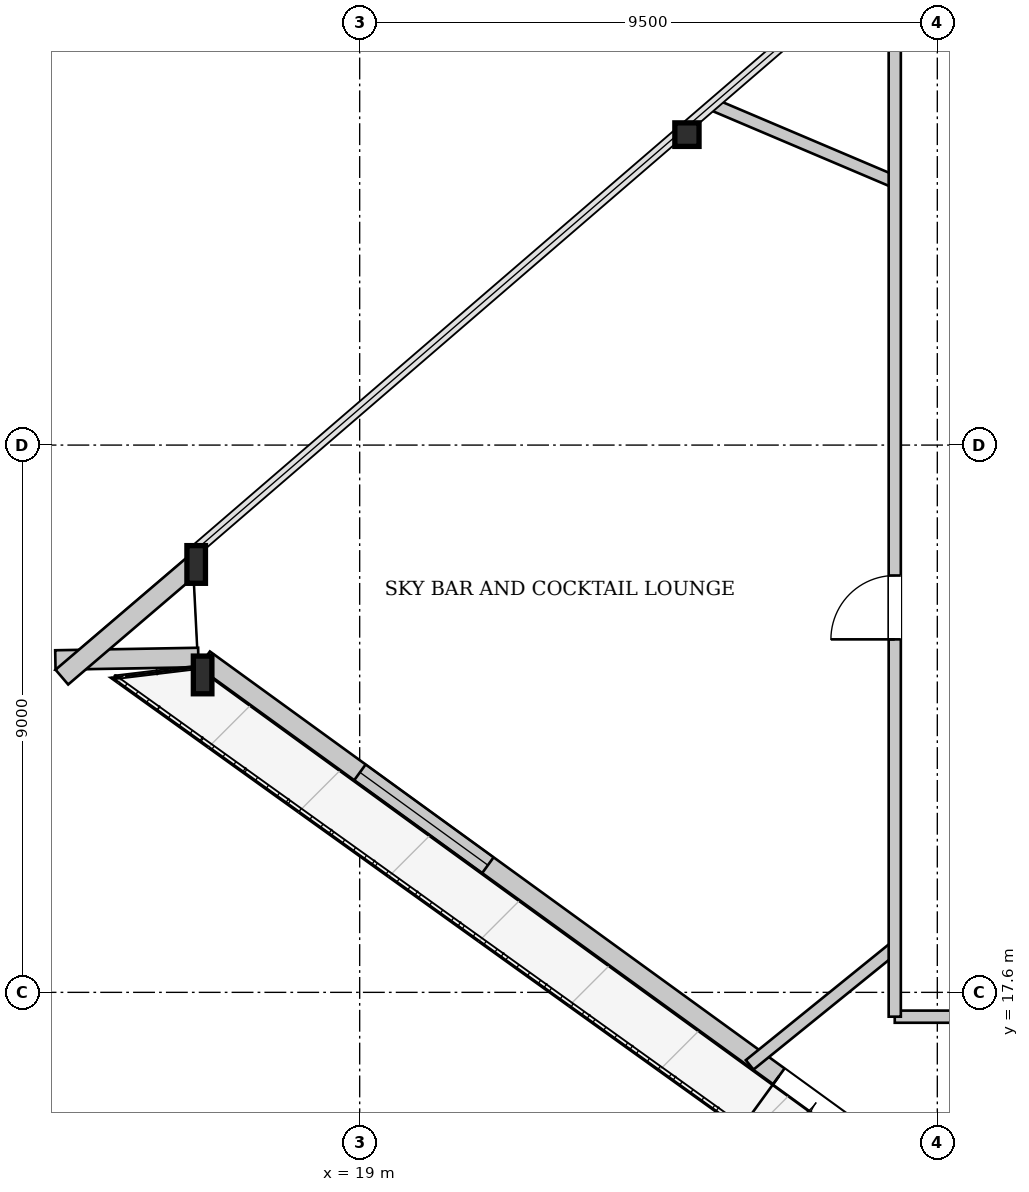
"""IFC4 building model, lengths in metres.
Left out: names, types, materials, properties, quantities, classifications, styles, units other than length and angle.
Written with IfcOpenShell. Run it as: python <this file> out.ifc"""

import sys

from ifc_helpers import new_model, si_unit, direction, frame, frame_2d, origin, origin_2d, place, context, subcontext, project, spatial, rectangle, i_section, extrude, source, transform, mapped, element, fill, save


model = new_model("IFC4")
c1 = context("Model", 3, precision=1e-05, world=origin(), true_north=direction((0.0, 1.0)))
c2 = subcontext(c1, "Body", "Model", "MODEL_VIEW")
j1 = project(units=[si_unit("LENGTHUNIT", "METRE"), si_unit("PLANEANGLEUNIT", "RADIAN")], contexts=[c1])
p1 = place(None, origin())
s1 = spatial("IfcSite", under=j1, at=p1, CompositionType="ELEMENT")
p2 = place(p1, origin())
s2 = spatial("IfcBuilding", under=s1, at=p2, CompositionType="ELEMENT")
p3 = place(p2, frame((0.0, 0.0, 281.9)))
s3 = spatial("IfcBuildingStorey", under=s2, at=p3, CompositionType="ELEMENT", Elevation=281.9)
m1 = source(origin(), c2, "Body", "SweptSolid", [
    extrude(i_section(OverallWidth=0.398, OverallDepth=0.387, WebThickness=0.019, FlangeThickness=0.029, at=origin_2d()), origin(), (0.0, 0.0, 1.0), 3.945),
])
p4 = place(p3, frame((24.392, 31.847, 0.0), z_axis=(-0.004888714821, -0.071598013262, 0.997421588379), x_axis=(0.997677037813, -0.068121422634, 0.0)))
e1 = element("IfcColumn", 1, at=p4, inside=s3, PredefinedType="COLUMN", context=c2, shape_type="MappedRepresentation", body=[
    mapped(m1, transform((0.0, 0.0, 0.0), x_axis=(1.0, 0.0, 0.0), y_axis=(0.0, 1.0, 0.0), z_axis=(0.0, 0.0, 1.0), scale=1.0)),
])
m2 = source(origin(), c2, "Body", "SweptSolid", [
    extrude(i_section(OverallWidth=0.305, OverallDepth=0.62, WebThickness=0.021, FlangeThickness=0.04, at=origin_2d()), origin(), (0.0, 0.0, 1.0), 3.956),
])
p5 = place(p3, frame((16.253, 24.833, 0.0), z_axis=(0.029189564882, -0.098923620519, 0.994666821908), x_axis=(0.95911741707, 0.283008445586, 0.0)))
e2 = element("IfcColumn", 2, at=p5, inside=s3, PredefinedType="COLUMN", context=c2, shape_type="MappedRepresentation", body=[
    mapped(m2, transform((0.0, 0.0, 0.0), x_axis=(1.0, 0.0, 0.0), y_axis=(0.0, 1.0, 0.0), z_axis=(0.0, 0.0, 1.0), scale=1.0)),
])
m3 = source(origin(), c2, "Body", "SweptSolid", [
    extrude(i_section(OverallWidth=0.305, OverallDepth=0.62, WebThickness=0.021, FlangeThickness=0.04, at=origin_2d()), origin(), (0.0, 0.0, 1.0), 3.946),
])
p6 = place(p3, frame((16.349, 22.947, 0.0), z_axis=(0.034527375469, -0.064290220632, 0.997333759518), x_axis=(0.880987884191, 0.473138825196, 0.0)))
e3 = element("IfcColumn", 3, at=p6, inside=s3, PredefinedType="COLUMN", context=c2, shape_type="MappedRepresentation", body=[
    mapped(m3, transform((0.0, 0.0, 0.0), x_axis=(1.0, 0.0, 0.0), y_axis=(0.0, 1.0, 0.0), z_axis=(0.0, 0.0, 1.0), scale=1.0)),
])
p7 = place(p3, frame((30.342, 12.993, 0.0), z_axis=(0.0, 0.0, 1.0), x_axis=(-0.80942781076, 0.587219396111, 0.0)))
e4 = element("IfcWall", 4, at=p7, inside=s3, PredefinedType="SOLIDWALL", context=c2, shape_type="SweptSolid", body=[
    extrude(rectangle(XDim=17.172, YDim=0.32, at=frame_2d((8.586, 0.0))), origin(), (0.0, 0.0, 1.0), 3.462),
])
p8 = place(p7, frame((3.995, 0.0, 0.0)))
e5 = element("IfcOpeningElement", 5, at=p8, cuts=e4, PredefinedType="OPENING", context=c2, shape_type="SweptSolid", body=[
    extrude(rectangle(XDim=1.5, YDim=2.3, at=frame_2d((0.75, 1.15))), frame((0.0, 0.17, 0.0), z_axis=(0.0, -1.0, 0.0), x_axis=(1.0, 0.0, 0.0)), (0.0, 0.0, 1.0), 0.34),
])
p9 = place(p7, frame((11.407, 0.0, 0.65)))
e6 = element("IfcOpeningElement", 6, at=p9, cuts=e4, PredefinedType="OPENING", context=c2, shape_type="SweptSolid", body=[
    extrude(rectangle(XDim=2.6, YDim=2.35, at=frame_2d((1.3, 1.175))), frame((0.0, 0.17, 0.0), z_axis=(0.0, -1.0, 0.0), x_axis=(1.0, 0.0, 0.0)), (0.0, 0.0, 1.0), 0.34),
])
p10 = place(p3, frame((16.346, 23.107, 0.0), z_axis=(0.0, 0.0, 1.0), x_axis=(-0.99984786229, -0.01744282875, 0.0)))
e7 = element("IfcWall", 7, at=p10, inside=s3, PredefinedType="SOLIDWALL", context=c2, shape_type="SweptSolid", body=[
    extrude(rectangle(XDim=2.351, YDim=0.32, at=frame_2d((1.176, 0.0))), origin(), (0.0, 0.0, 1.0), 3.462),
])
p11 = place(p3, frame((14.102, 22.784, 0.0), z_axis=(0.0, 0.0, 1.0), x_axis=(0.760365209759, 0.649495764257, 0.0)))
e8 = element("IfcWall", 8, at=p11, inside=s3, PredefinedType="SOLIDWALL", context=c2, shape_type="SweptSolid", body=[
    extrude(rectangle(XDim=2.966, YDim=0.32, at=frame_2d((1.483, 0.0))), origin(), (0.0, 0.0, 1.0), 3.462),
])
p12 = place(p3, frame((27.8, 30.93, 0.0), z_axis=(0.0, 0.0, 1.0), x_axis=(-0.920507458903, 0.390724990376, 0.0)))
e9 = element("IfcWall", 9, at=p12, inside=s3, PredefinedType="PARTITIONING", context=c2, shape_type="SweptSolid", body=[
    extrude(rectangle(XDim=3.222, YDim=0.2, at=frame_2d((1.611, 0.0))), origin(), (0.0, 0.0, 1.0), 3.92),
])
p13 = place(p3, frame((27.8, 18.34, 0.0), z_axis=(0.0, 0.0, 1.0), x_axis=(-0.777170804973, -0.629289710625, 0.0)))
e10 = element("IfcWall", 10, at=p13, inside=s3, PredefinedType="PARTITIONING", context=c2, shape_type="SweptSolid", body=[
    extrude(rectangle(XDim=3.071, YDim=0.2, at=frame_2d((1.535, 0.0))), origin(), (0.0, 0.0, 1.0), 3.92),
])
p14 = place(p3, frame((27.8, 17.2, 0.0), z_axis=(0.0, 0.0, 1.0), x_axis=(1.0, 0.0, 0.0)))
e11 = element("IfcWall", 11, at=p14, inside=s3, PredefinedType="PARTITIONING", context=c2, shape_type="SweptSolid", body=[
    extrude(rectangle(XDim=20.4, YDim=0.2, at=frame_2d((10.2, 0.0))), origin(), (0.0, 0.0, 1.0), 3.92),
])
p15 = place(p14, frame((5.209, 0.0, 0.0)))
e12 = element("IfcOpeningElement", 12, at=p15, cuts=e11, PredefinedType="OPENING", context=c2, shape_type="SweptSolid", body=[
    extrude(rectangle(XDim=1.05, YDim=2.2, at=frame_2d((0.525, 1.1))), frame((0.0, 0.11, 0.0), z_axis=(0.0, -1.0, 0.0), x_axis=(1.0, 0.0, 0.0)), (0.0, 0.0, 1.0), 0.22),
])
p16 = place(p14, frame((15.339, 0.0, 0.0)))
e13 = element("IfcOpeningElement", 13, at=p16, cuts=e11, PredefinedType="OPENING", context=c2, shape_type="SweptSolid", body=[
    extrude(rectangle(XDim=1.05, YDim=2.2, at=frame_2d((0.525, 1.1))), frame((0.0, 0.11, 0.0), z_axis=(0.0, -1.0, 0.0), x_axis=(1.0, 0.0, 0.0)), (0.0, 0.0, 1.0), 0.22),
])
p17 = place(p3, frame((27.8, 17.2, 0.0), z_axis=(0.0, 0.0, 1.0), x_axis=(0.0, 1.0, 0.0)))
e14 = element("IfcWall", 14, at=p17, inside=s3, PredefinedType="PARTITIONING", context=c2, shape_type="SweptSolid", body=[
    extrude(rectangle(XDim=17.544, YDim=0.2, at=frame_2d((8.772, 0.0))), origin(), (0.0, 0.0, 1.0), 3.92),
])
p18 = place(p17, frame((6.205, 0.0, 0.0)))
e15 = element("IfcOpeningElement", 15, at=p18, cuts=e14, PredefinedType="OPENING", context=c2, shape_type="SweptSolid", body=[
    extrude(rectangle(XDim=1.05, YDim=2.2, at=frame_2d((0.525, 1.1))), frame((0.0, 0.11, 0.0), z_axis=(0.0, -1.0, 0.0), x_axis=(1.0, 0.0, 0.0)), (0.0, 0.0, 1.0), 0.22),
])
m4 = source(origin(), c2, "Body", "SweptSolid", [
    extrude(rectangle(XDim=1.5, YDim=2.3, at=frame_2d((0.75, 1.15))), frame((0.0, 0.025, 0.0), z_axis=(0.0, -1.0, 0.0), x_axis=(1.0, 0.0, 0.0)), (0.0, 0.0, 1.0), 0.05),
])
p19 = place(p8, origin())
e16 = element("IfcDoor", 16, at=p19, inside=s3, OperationType="DOUBLE_DOOR_SINGLE_SWING", PredefinedType="DOOR", context=c2, shape_type="MappedRepresentation", body=[
    mapped(m4, transform((0.0, 0.0, 0.0), x_axis=(1.0, 0.0, 0.0), y_axis=(0.0, 1.0, 0.0), z_axis=(0.0, 0.0, 1.0), scale=1.0)),
])
fill(e5, e16)
m5 = source(origin(), c2, "Body", "SweptSolid", [
    extrude(rectangle(XDim=2.6, YDim=2.35, at=frame_2d((1.3, 1.175))), frame((0.0, 0.03, 0.0), z_axis=(0.0, -1.0, 0.0), x_axis=(1.0, 0.0, 0.0)), (0.0, 0.0, 1.0), 0.06),
])
p20 = place(p9, origin())
e17 = element("IfcWindow", 17, at=p20, inside=s3, PartitioningType="SINGLE_PANEL", PredefinedType="WINDOW", context=c2, shape_type="MappedRepresentation", body=[
    mapped(m5, transform((0.0, 0.0, 0.0), x_axis=(1.0, 0.0, 0.0), y_axis=(0.0, 1.0, 0.0), z_axis=(0.0, 0.0, 1.0), scale=1.0)),
])
fill(e6, e17)
m6 = source(origin(), c2, "Body", "SweptSolid", [
    extrude(rectangle(XDim=1.05, YDim=2.2, at=frame_2d((0.525, 1.1))), frame((0.0, 0.025, 0.0), z_axis=(0.0, -1.0, 0.0), x_axis=(1.0, 0.0, 0.0)), (0.0, 0.0, 1.0), 0.05),
])
p21 = place(p18, origin())
e18 = element("IfcDoor", 18, at=p21, inside=s3, OperationType="SINGLE_SWING_LEFT", PredefinedType="DOOR", context=c2, shape_type="MappedRepresentation", body=[
    mapped(m6, transform((0.0, 0.0, 0.0), x_axis=(1.0, 0.0, 0.0), y_axis=(0.0, 1.0, 0.0), z_axis=(0.0, 0.0, 1.0), scale=1.0)),
])
fill(e15, e18)
save(model, sys.argv[1])
